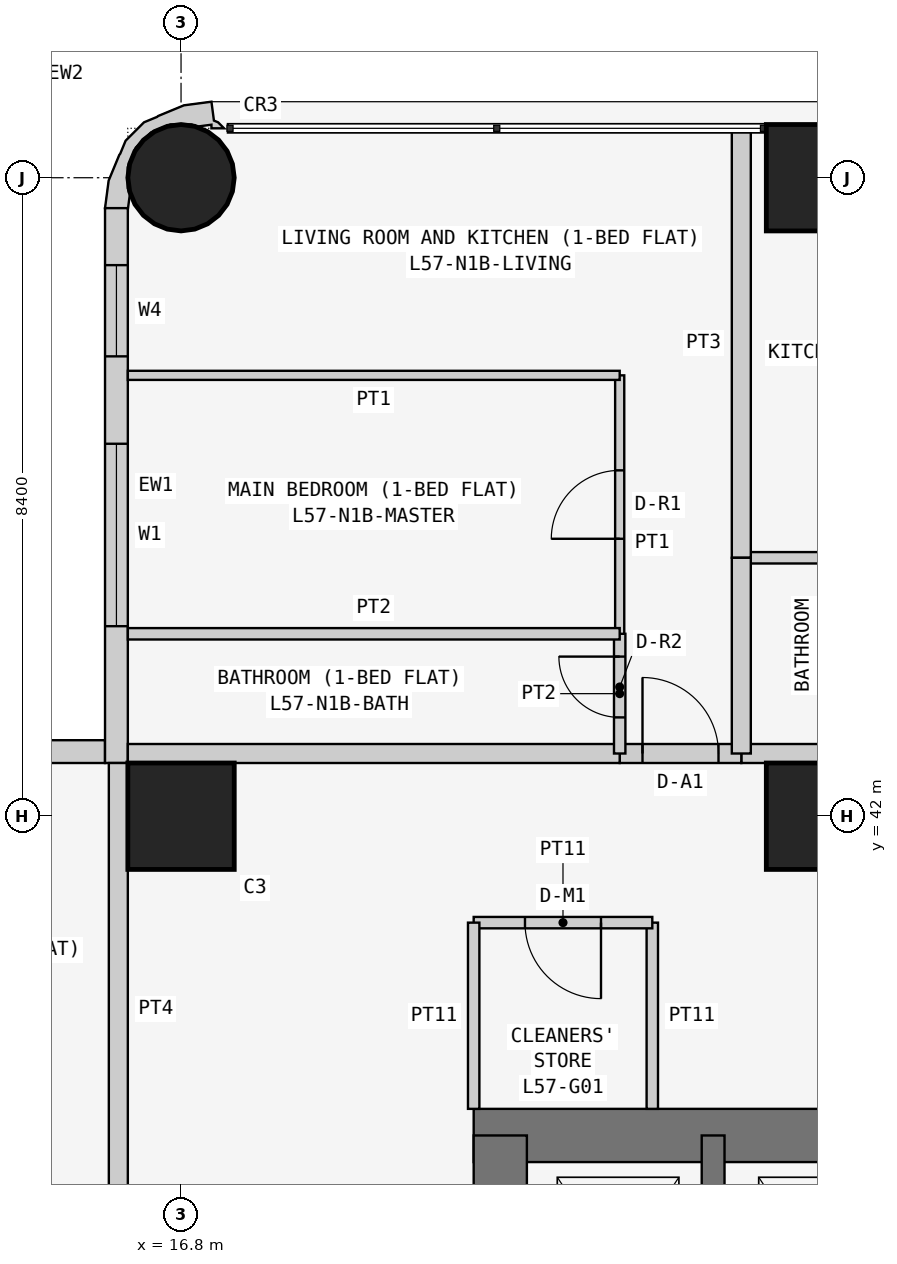
"""IFC4 building model, lengths in metres.
Left out: names, types, materials, properties, quantities, classifications, styles, units other than length and angle.
Written with IfcOpenShell. Run it as: python <this file> out.ifc"""

import sys

from ifc_helpers import new_model, si_unit, direction, frame, frame_2d, origin, origin_2d, place, context, subcontext, project, spatial, polyline, rectangle, circle, outline, extrude, element, fill, save


model = new_model("IFC4")
c1 = context("Model", 3, precision=1e-05, world=origin(), true_north=direction((0.0, 1.0)))
c2 = subcontext(c1, "Body", "Model", "MODEL_VIEW")
j1 = project(units=[si_unit("LENGTHUNIT", "METRE"), si_unit("PLANEANGLEUNIT", "RADIAN")], contexts=[c1])
p1 = place(None, origin())
s1 = spatial("IfcSite", under=j1, at=p1, CompositionType="ELEMENT")
p2 = place(p1, origin())
s2 = spatial("IfcBuilding", under=s1, at=p2, CompositionType="ELEMENT")
p3 = place(p2, frame((0.0, 0.0, 219.3)))
s3 = spatial("IfcBuildingStorey", under=s2, at=p3, CompositionType="ELEMENT", Elevation=219.3)
p4 = place(p3, frame((16.8, 42.0, 0.0), z_axis=(0.0, 0.0, 1.0), x_axis=(1.0, 0.0, 0.0)))
e1 = element("IfcColumn", 1, at=p4, inside=s3, PredefinedType="COLUMN", context=c2, shape_type="SweptSolid", body=[
    extrude(rectangle(XDim=1.4, YDim=1.4, at=origin_2d()), origin(), (0.0, 0.0, 1.0), 3.6),
])
p5 = place(p3, frame((16.8, 50.4, 0.0), z_axis=(0.0, 0.0, 1.0), x_axis=(1.0, 0.0, 0.0)))
e2 = element("IfcColumn", 2, at=p5, inside=s3, PredefinedType="COLUMN", context=c2, shape_type="SweptSolid", body=[
    extrude(circle(Radius=0.7, at=origin_2d()), origin(), (0.0, 0.0, 1.0), 3.6),
])
for number, where, z_axis, x_axis in (
    (3, (25.2, 42.0, 0.0), (0.0, 0.0, 1.0), (1.0, 0.0, 0.0)),
    (4, (25.2, 50.4, 0.0), (0.0, 0.0, 1.0), (1.0, 0.0, 0.0)),
):
    element("IfcColumn", number, at=place(p3, frame(where, z_axis=z_axis, x_axis=x_axis)), inside=s3, PredefinedType="COLUMN", context=c2, shape_type="SweptSolid", body=[
        extrude(rectangle(XDim=1.4, YDim=1.4, at=origin_2d()), origin(), (0.0, 0.0, 1.0), 3.6),
    ])
p6 = place(p3, frame((37.8, 37.8, 0.0), z_axis=(0.0, 0.0, 1.0), x_axis=(-1.0, 0.0, 0.0)))
e5 = element("IfcWall", 5, at=p6, inside=s3, PredefinedType="SHEAR", context=c2, shape_type="SweptSolid", body=[
    extrude(rectangle(XDim=17.15, YDim=0.7, at=frame_2d((8.575, 0.0))), origin(), (0.0, 0.0, 1.0), 3.6),
])
p7 = place(p3, frame((21.0, 37.8, 0.0), z_axis=(0.0, 0.0, 1.0), x_axis=(0.0, -1.0, 0.0)))
e6 = element("IfcWall", 6, at=p7, inside=s3, PredefinedType="SHEAR", context=c2, shape_type="SweptSolid", body=[
    extrude(rectangle(XDim=17.15, YDim=0.7, at=frame_2d((8.575, 0.0))), origin(), (0.0, 0.0, 1.0), 3.6),
])
p8 = place(p7, frame((5.4, 0.0, 0.0)))
e7 = element("IfcOpeningElement", 7, at=p8, cuts=e6, PredefinedType="OPENING", context=c2, shape_type="SweptSolid", body=[
    extrude(rectangle(XDim=1.2, YDim=2.1, at=frame_2d((0.6, 1.05))), frame((0.0, 0.36, 0.0), z_axis=(0.0, -1.0, 0.0), x_axis=(1.0, 0.0, 0.0)), (0.0, 0.0, 1.0), 0.72),
])
p9 = place(p3, frame((23.8, 34.6, 0.0), z_axis=(0.0, 0.0, 1.0), x_axis=(0.0, 1.0, 0.0)))
e8 = element("IfcWall", 8, at=p9, inside=s3, PredefinedType="SHEAR", context=c2, shape_type="SweptSolid", body=[
    extrude(rectangle(XDim=3.2, YDim=0.3, at=frame_2d((1.6, 0.0))), origin(), (0.0, 0.0, 1.0), 3.6),
])
p10 = place(p3, frame((15.8, 42.85, 0.0), z_axis=(0.0, 0.0, 1.0), x_axis=(-1.0, 0.0, 0.0)))
e9 = element("IfcWall", 9, at=p10, inside=s3, PredefinedType="SOLIDWALL", context=c2, shape_type="SweptSolid", body=[
    extrude(rectangle(XDim=15.4, YDim=0.3, at=frame_2d((7.7, 0.0))), origin(), (0.0, 0.0, 1.0), 3.45),
])
p11 = place(p10, frame((1.2, 0.0, 0.9)))
e10 = element("IfcOpeningElement", 10, at=p11, cuts=e9, PredefinedType="OPENING", context=c2, shape_type="SweptSolid", body=[
    extrude(rectangle(XDim=1.8, YDim=1.5, at=frame_2d((0.9, 0.75))), frame((0.0, 0.16, 0.0), z_axis=(0.0, -1.0, 0.0), x_axis=(1.0, 0.0, 0.0)), (0.0, 0.0, 1.0), 0.32),
])
p12 = place(p10, frame((4.95, 0.0, 1.5)))
e11 = element("IfcOpeningElement", 11, at=p12, cuts=e9, PredefinedType="OPENING", context=c2, shape_type="SweptSolid", body=[
    extrude(rectangle(XDim=0.9, YDim=0.7, at=frame_2d((0.45, 0.35))), frame((0.0, 0.16, 0.0), z_axis=(0.0, -1.0, 0.0), x_axis=(1.0, 0.0, 0.0)), (0.0, 0.0, 1.0), 0.32),
])
p13 = place(p10, frame((8.5, 0.0, 0.9)))
e12 = element("IfcOpeningElement", 12, at=p13, cuts=e9, PredefinedType="OPENING", context=c2, shape_type="SweptSolid", body=[
    extrude(rectangle(XDim=1.8, YDim=1.5, at=frame_2d((0.9, 0.75))), frame((0.0, 0.16, 0.0), z_axis=(0.0, -1.0, 0.0), x_axis=(1.0, 0.0, 0.0)), (0.0, 0.0, 1.0), 0.32),
])
p14 = place(p10, frame((12.5, 0.0, 0.0)))
e13 = element("IfcOpeningElement", 13, at=p14, cuts=e9, PredefinedType="OPENING", context=c2, shape_type="SweptSolid", body=[
    extrude(rectangle(XDim=0.9, YDim=2.4, at=frame_2d((0.45, 1.2))), frame((0.0, 0.16, 0.0), z_axis=(0.0, -1.0, 0.0), x_axis=(1.0, 0.0, 0.0)), (0.0, 0.0, 1.0), 0.32),
])
p15 = place(p10, frame((13.5, 0.0, 0.9)))
e14 = element("IfcOpeningElement", 14, at=p15, cuts=e9, PredefinedType="OPENING", context=c2, shape_type="SweptSolid", body=[
    extrude(rectangle(XDim=1.2, YDim=1.5, at=frame_2d((0.6, 0.75))), frame((0.0, 0.16, 0.0), z_axis=(0.0, -1.0, 0.0), x_axis=(1.0, 0.0, 0.0)), (0.0, 0.0, 1.0), 0.32),
])
p16 = place(p3, frame((15.95, 50.0, 0.0), z_axis=(0.0, 0.0, 1.0), x_axis=(0.0, -1.0, 0.0)))
e15 = element("IfcWall", 15, at=p16, inside=s3, PredefinedType="SOLIDWALL", context=c2, shape_type="SweptSolid", body=[
    extrude(rectangle(XDim=7.3, YDim=0.3, at=frame_2d((3.65, 0.0))), origin(), (0.0, 0.0, 1.0), 3.45),
])
p17 = place(p16, frame((3.1, 0.0, 0.9)))
e16 = element("IfcOpeningElement", 16, at=p17, cuts=e15, PredefinedType="OPENING", context=c2, shape_type="SweptSolid", body=[
    extrude(rectangle(XDim=2.4, YDim=1.5, at=frame_2d((1.2, 0.75))), frame((0.0, 0.16, 0.0), z_axis=(0.0, -1.0, 0.0), x_axis=(1.0, 0.0, 0.0)), (0.0, 0.0, 1.0), 0.32),
])
p18 = place(p16, frame((0.75, 0.0, 0.9)))
e17 = element("IfcOpeningElement", 17, at=p18, cuts=e15, PredefinedType="OPENING", context=c2, shape_type="SweptSolid", body=[
    extrude(rectangle(XDim=1.2, YDim=1.5, at=frame_2d((0.6, 0.75))), frame((0.0, 0.16, 0.0), z_axis=(0.0, -1.0, 0.0), x_axis=(1.0, 0.0, 0.0)), (0.0, 0.0, 1.0), 0.32),
])
p19 = place(p3, frame((17.312, 50.988, 0.0), z_axis=(0.0, 0.0, 1.0), x_axis=(-0.439933741929, 0.898030234854, 0.0)))
e18 = element("IfcWall", 18, at=p19, inside=s3, PredefinedType="SOLIDWALL", context=c2, shape_type="SweptSolid", body=[
    extrude(outline(polyline([(0.138, -0.039), (0.182, -0.0), (0.419, -0.08), (0.536, 0.266), (0.559, 0.631), (0.555, 0.651), (0.566, 0.836), (0.456, 1.159), (0.333, 1.298), (0.324, 1.316), (0.082, 1.591), (-0.222, 1.793), (-0.39, 1.541), (-0.372, 1.532), (-0.195, 1.414), (-0.12, 1.41), (0.131, 1.287), (0.315, 1.078), (0.406, 0.814), (0.388, 0.536), (0.265, 0.285), (0.209, 0.236), (0.148, 0.053), (0.105, 0.074), (0.032, -0.076), (0.138, -0.039)])), origin(), (0.0, 0.0, 1.0), 3.45),
])
p20 = place(p3, frame((23.0, 38.15, 0.0), z_axis=(0.0, 0.0, 1.0), x_axis=(0.0, 1.0, 0.0)))
e19 = element("IfcWall", 19, at=p20, inside=s3, PredefinedType="PARTITIONING", context=c2, shape_type="SweptSolid", body=[
    extrude(rectangle(XDim=2.45, YDim=0.15, at=frame_2d((1.225, 0.0))), origin(), (0.0, 0.0, 1.0), 3.45),
])
p21 = place(p3, frame((23.0, 40.6, 0.0), z_axis=(0.0, 0.0, 1.0), x_axis=(-1.0, 0.0, 0.0)))
e20 = element("IfcWall", 20, at=p21, inside=s3, PredefinedType="PARTITIONING", context=c2, shape_type="SweptSolid", body=[
    extrude(rectangle(XDim=2.35, YDim=0.15, at=frame_2d((1.175, 0.0))), origin(), (0.0, 0.0, 1.0), 3.45),
])
p22 = place(p21, frame((0.675, 0.0, 0.0)))
e21 = element("IfcOpeningElement", 21, at=p22, cuts=e20, PredefinedType="OPENING", context=c2, shape_type="SweptSolid", body=[
    extrude(rectangle(XDim=1.0, YDim=2.1, at=frame_2d((0.5, 1.05))), frame((0.0, 0.085, 0.0), z_axis=(0.0, -1.0, 0.0), x_axis=(1.0, 0.0, 0.0)), (0.0, 0.0, 1.0), 0.17),
])
p23 = place(p3, frame((20.65, 40.6, 0.0), z_axis=(0.0, 0.0, 1.0), x_axis=(0.0, -1.0, 0.0)))
e22 = element("IfcWall", 22, at=p23, inside=s3, PredefinedType="PARTITIONING", context=c2, shape_type="SweptSolid", body=[
    extrude(rectangle(XDim=2.45, YDim=0.15, at=frame_2d((1.225, 0.0))), origin(), (0.0, 0.0, 1.0), 3.45),
])
p24 = place(p3, frame((24.171, 42.825, 0.0), z_axis=(0.0, 0.0, 1.0), x_axis=(1.0, 0.0, 0.0)))
e23 = element("IfcWall", 23, at=p24, inside=s3, PredefinedType="PARTITIONING", context=c2, shape_type="SweptSolid", body=[
    extrude(rectangle(XDim=2.629, YDim=0.25, at=frame_2d((1.314, 0.0))), origin(), (0.0, 0.0, 1.0), 3.45),
])
p25 = place(p3, frame((22.571, 42.825, 0.0), z_axis=(0.0, 0.0, 1.0), x_axis=(1.0, 0.0, 0.0)))
e24 = element("IfcWall", 24, at=p25, inside=s3, PredefinedType="PARTITIONING", context=c2, shape_type="SweptSolid", body=[
    extrude(rectangle(XDim=1.6, YDim=0.25, at=frame_2d((0.8, 0.0))), origin(), (0.0, 0.0, 1.0), 3.45),
])
p26 = place(p25, frame((0.3, 0.0, 0.0)))
e25 = element("IfcOpeningElement", 25, at=p26, cuts=e24, PredefinedType="OPENING", context=c2, shape_type="SweptSolid", body=[
    extrude(rectangle(XDim=1.0, YDim=2.1, at=frame_2d((0.5, 1.05))), frame((0.0, 0.135, 0.0), z_axis=(0.0, -1.0, 0.0), x_axis=(1.0, 0.0, 0.0)), (0.0, 0.0, 1.0), 0.27),
])
for number, where, z_axis, x_axis in (
    (26, (16.1, 42.825, 0.0), (0.0, 0.0, 1.0), (1.0, 0.0, 0.0)),
    (27, (15.975, 36.229, 0.0), (0.0, 0.0, 1.0), (0.0, 1.0, 0.0)),
):
    element("IfcWall", number, at=place(p3, frame(where, z_axis=z_axis, x_axis=x_axis)), inside=s3, PredefinedType="PARTITIONING", context=c2, shape_type="SweptSolid", body=[
        extrude(rectangle(XDim=6.471, YDim=0.25, at=frame_2d((3.235, 0.0))), origin(), (0.0, 0.0, 1.0), 3.45),
    ])
p27 = place(p3, frame((26.8, 45.4, 0.0), z_axis=(0.0, 0.0, 1.0), x_axis=(-1.0, 0.0, 0.0)))
e28 = element("IfcWall", 28, at=p27, inside=s3, PredefinedType="PARTITIONING", context=c2, shape_type="SweptSolid", body=[
    extrude(rectangle(XDim=2.629, YDim=0.15, at=frame_2d((1.314, 0.0))), origin(), (0.0, 0.0, 1.0), 3.45),
])
p28 = place(p3, frame((24.171, 45.4, 0.0), z_axis=(0.0, 0.0, 1.0), x_axis=(0.0, 1.0, 0.0)))
e29 = element("IfcWall", 29, at=p28, inside=s3, PredefinedType="PARTITIONING", context=c2, shape_type="SweptSolid", body=[
    extrude(rectangle(XDim=5.65, YDim=0.25, at=frame_2d((2.825, 0.0))), origin(), (0.0, 0.0, 1.0), 3.45),
])
p29 = place(p3, frame((24.171, 45.4, 0.0), z_axis=(0.0, 0.0, 1.0), x_axis=(0.0, -1.0, 0.0)))
e30 = element("IfcWall", 30, at=p29, inside=s3, PredefinedType="PARTITIONING", context=c2, shape_type="SweptSolid", body=[
    extrude(rectangle(XDim=2.575, YDim=0.25, at=frame_2d((1.288, 0.0))), origin(), (0.0, 0.0, 1.0), 3.45),
])
p30 = place(p3, frame((22.571, 42.825, 0.0), z_axis=(0.0, 0.0, 1.0), x_axis=(0.0, 1.0, 0.0)))
e31 = element("IfcWall", 31, at=p30, inside=s3, PredefinedType="PARTITIONING", context=c2, shape_type="SweptSolid", body=[
    extrude(rectangle(XDim=1.575, YDim=0.15, at=frame_2d((0.788, 0.0))), origin(), (0.0, 0.0, 1.0), 3.45),
])
p31 = place(p30, frame((0.475, 0.0, 0.0)))
e32 = element("IfcOpeningElement", 32, at=p31, cuts=e31, PredefinedType="OPENING", context=c2, shape_type="SweptSolid", body=[
    extrude(rectangle(XDim=0.8, YDim=2.1, at=frame_2d((0.4, 1.05))), frame((0.0, 0.085, 0.0), z_axis=(0.0, -1.0, 0.0), x_axis=(1.0, 0.0, 0.0)), (0.0, 0.0, 1.0), 0.17),
])
p32 = place(p3, frame((22.571, 44.4, 0.0), z_axis=(0.0, 0.0, 1.0), x_axis=(0.0, 1.0, 0.0)))
e33 = element("IfcWall", 33, at=p32, inside=s3, PredefinedType="PARTITIONING", context=c2, shape_type="SweptSolid", body=[
    extrude(rectangle(XDim=3.4, YDim=0.12, at=frame_2d((1.7, 0.0))), origin(), (0.0, 0.0, 1.0), 3.45),
])
p33 = place(p32, frame((1.25, 0.0, 0.0)))
e34 = element("IfcOpeningElement", 34, at=p33, cuts=e33, PredefinedType="OPENING", context=c2, shape_type="SweptSolid", body=[
    extrude(rectangle(XDim=0.9, YDim=2.1, at=frame_2d((0.45, 1.05))), frame((0.0, 0.07, 0.0), z_axis=(0.0, -1.0, 0.0), x_axis=(1.0, 0.0, 0.0)), (0.0, 0.0, 1.0), 0.14),
])
p34 = place(p3, frame((22.571, 47.8, 0.0), z_axis=(0.0, 0.0, 1.0), x_axis=(-1.0, 0.0, 0.0)))
e35 = element("IfcWall", 35, at=p34, inside=s3, PredefinedType="PARTITIONING", context=c2, shape_type="SweptSolid", body=[
    extrude(rectangle(XDim=6.471, YDim=0.12, at=frame_2d((3.235, 0.0))), origin(), (0.0, 0.0, 1.0), 3.45),
])
p35 = place(p3, frame((22.571, 44.4, 0.0), z_axis=(0.0, 0.0, 1.0), x_axis=(-1.0, 0.0, 0.0)))
e36 = element("IfcWall", 36, at=p35, inside=s3, PredefinedType="PARTITIONING", context=c2, shape_type="SweptSolid", body=[
    extrude(rectangle(XDim=6.471, YDim=0.15, at=frame_2d((3.235, 0.0))), origin(), (0.0, 0.0, 1.0), 3.45),
])
p36 = place(p17, origin())
e37 = element("IfcWindow", 37, at=p36, inside=s3, PartitioningType="SINGLE_PANEL", PredefinedType="WINDOW", context=c2, shape_type="SweptSolid", body=[
    extrude(rectangle(XDim=2.4, YDim=1.5, at=frame_2d((1.2, 0.75))), frame((0.0, 0.03, 0.0), z_axis=(0.0, -1.0, 0.0), x_axis=(1.0, 0.0, 0.0)), (0.0, 0.0, 1.0), 0.06),
])
fill(e16, e37)
p37 = place(p18, origin())
e38 = element("IfcWindow", 38, at=p37, inside=s3, PartitioningType="SINGLE_PANEL", PredefinedType="WINDOW", context=c2, shape_type="SweptSolid", body=[
    extrude(rectangle(XDim=1.2, YDim=1.5, at=frame_2d((0.6, 0.75))), frame((0.0, 0.03, 0.0), z_axis=(0.0, -1.0, 0.0), x_axis=(1.0, 0.0, 0.0)), (0.0, 0.0, 1.0), 0.06),
])
fill(e17, e38)
p38 = place(p22, origin())
e39 = element("IfcDoor", 39, at=p38, inside=s3, OperationType="SINGLE_SWING_LEFT", PredefinedType="DOOR", context=c2, shape_type="SweptSolid", body=[
    extrude(rectangle(XDim=1.0, YDim=2.1, at=frame_2d((0.5, 1.05))), frame((0.0, 0.025, 0.0), z_axis=(0.0, -1.0, 0.0), x_axis=(1.0, 0.0, 0.0)), (0.0, 0.0, 1.0), 0.05),
])
fill(e21, e39)
p39 = place(p26, origin())
e40 = element("IfcDoor", 40, at=p39, inside=s3, OperationType="SINGLE_SWING_LEFT", PredefinedType="DOOR", context=c2, shape_type="SweptSolid", body=[
    extrude(rectangle(XDim=1.0, YDim=2.1, at=frame_2d((0.5, 1.05))), frame((0.0, 0.025, 0.0), z_axis=(0.0, -1.0, 0.0), x_axis=(1.0, 0.0, 0.0)), (0.0, 0.0, 1.0), 0.05),
])
fill(e25, e40)
p40 = place(p31, origin())
e41 = element("IfcDoor", 41, at=p40, inside=s3, OperationType="SINGLE_SWING_RIGHT", PredefinedType="DOOR", context=c2, shape_type="SweptSolid", body=[
    extrude(rectangle(XDim=0.8, YDim=2.1, at=frame_2d((0.4, 1.05))), frame((0.0, 0.025, 0.0), z_axis=(0.0, -1.0, 0.0), x_axis=(1.0, 0.0, 0.0)), (0.0, 0.0, 1.0), 0.05),
])
fill(e32, e41)
p41 = place(p33, origin())
e42 = element("IfcDoor", 42, at=p41, inside=s3, OperationType="SINGLE_SWING_LEFT", PredefinedType="DOOR", context=c2, shape_type="SweptSolid", body=[
    extrude(rectangle(XDim=0.9, YDim=2.1, at=frame_2d((0.45, 1.05))), frame((0.0, 0.025, 0.0), z_axis=(0.0, -1.0, 0.0), x_axis=(1.0, 0.0, 0.0)), (0.0, 0.0, 1.0), 0.05),
])
fill(e34, e42)
save(model, sys.argv[1])
